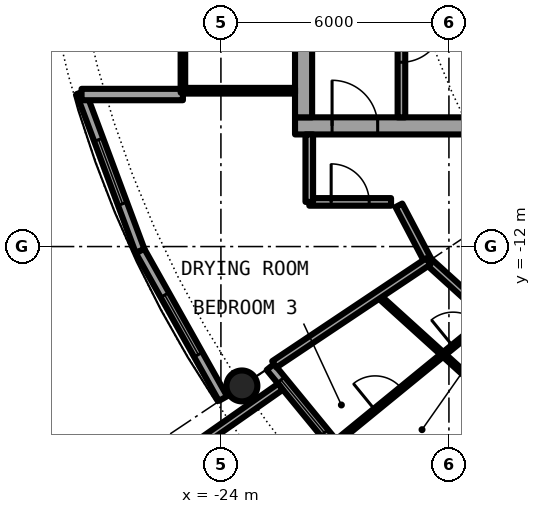
"""IFC4 building model, lengths in metres.
Left out: names, types, materials, properties, quantities, classifications, styles, units other than length and angle.
Written with IfcOpenShell. Run it as: python <this file> out.ifc"""

import sys

from ifc_helpers import new_model, si_unit, direction, frame, frame_2d, origin, origin_2d, place, context, subcontext, project, spatial, rectangle, hollow_circle, extrude, element, fill, save


model = new_model("IFC4")
c1 = context("Model", 3, precision=1e-05, world=origin(), true_north=direction((0.0, 1.0)))
c2 = subcontext(c1, "Body", "Model", "MODEL_VIEW")
j1 = project(units=[si_unit("LENGTHUNIT", "METRE"), si_unit("PLANEANGLEUNIT", "RADIAN")], contexts=[c1])
p1 = place(None, origin())
s1 = spatial("IfcSite", under=j1, at=p1, CompositionType="ELEMENT")
p2 = place(p1, origin())
s2 = spatial("IfcBuilding", under=s1, at=p2, CompositionType="ELEMENT")
p3 = place(p2, frame((0.0, 0.0, 202.4)))
s3 = spatial("IfcBuildingStorey", under=s2, at=p3, CompositionType="ELEMENT", Elevation=202.4)
p4 = place(p3, frame((-23.448, -15.667, 0.0), z_axis=(0.0, 0.0, 1.0), x_axis=(1.0, 0.0, 0.0)))
e1 = element("IfcColumn", 1, at=p4, inside=s3, PredefinedType="COLUMN", context=c2, shape_type="SweptSolid", body=[
    extrude(hollow_circle(Radius=0.406, WallThickness=0.03, at=origin_2d()), origin(), (0.0, 0.0, 1.0), 3.05),
])
p5 = place(p3, frame((-22.699, -15.167, 0.0), z_axis=(0.0, 0.0, 1.0), x_axis=(0.634382322723, -0.773019449054, 0.0)))
e2 = element("IfcWall", 2, at=p5, inside=s3, PredefinedType="SOLIDWALL", context=c2, shape_type="SweptSolid", body=[
    extrude(rectangle(XDim=5.352, YDim=0.25, at=frame_2d((2.676, 0.0))), origin(), (0.0, 0.0, 1.0), 2.7),
])
p6 = place(p5, frame((0.441, 0.0, 0.3)))
e3 = element("IfcOpeningElement", 3, at=p6, cuts=e2, PredefinedType="OPENING", context=c2, shape_type="SweptSolid", body=[
    extrude(rectangle(XDim=1.8, YDim=2.1, at=frame_2d((0.9, 1.05))), frame((0.0, 0.135, 0.0), z_axis=(0.0, -1.0, 0.0), x_axis=(1.0, 0.0, 0.0)), (0.0, 0.0, 1.0), 0.27),
])
p7 = place(p5, frame((3.51, 0.0, 0.0)))
e4 = element("IfcOpeningElement", 4, at=p7, cuts=e2, PredefinedType="OPENING", context=c2, shape_type="SweptSolid", body=[
    extrude(rectangle(XDim=1.0, YDim=2.2, at=frame_2d((0.5, 1.1))), frame((0.0, 0.135, 0.0), z_axis=(0.0, -1.0, 0.0), x_axis=(1.0, 0.0, 0.0)), (0.0, 0.0, 1.0), 0.27),
])
p8 = place(p3, frame((-22.433, -15.688, -0.03), z_axis=(0.0, 0.0, 1.0), x_axis=(-0.819373043115, -0.573260687834, 0.0)))
e5 = element("IfcWall", 5, at=p8, inside=s3, PredefinedType="SOLIDWALL", context=c2, shape_type="SweptSolid", body=[
    extrude(rectangle(XDim=2.925, YDim=0.2, at=frame_2d((1.463, 0.0))), origin(), (0.0, 0.0, 1.0), 2.73),
])
p9 = place(p3, frame((-27.682, -7.945, 0.0), z_axis=(0.0, 0.0, 1.0), x_axis=(0.349247811493, -0.937030397675, 0.0)))
e6 = element("IfcWall", 6, at=p9, inside=s3, PredefinedType="SOLIDWALL", context=c2, shape_type="SweptSolid", body=[
    extrude(rectangle(XDim=4.452, YDim=0.25, at=frame_2d((2.226, 0.0))), origin(), (0.0, 0.0, 1.0), 2.7),
])
p10 = place(p9, frame((1.327, 0.0, 0.3)))
e7 = element("IfcOpeningElement", 7, at=p10, cuts=e6, PredefinedType="OPENING", context=c2, shape_type="SweptSolid", body=[
    extrude(rectangle(XDim=1.8, YDim=2.1, at=frame_2d((0.9, 1.05))), frame((0.0, 0.135, 0.0), z_axis=(0.0, -1.0, 0.0), x_axis=(1.0, 0.0, 0.0)), (0.0, 0.0, 1.0), 0.27),
])
p11 = place(p3, frame((-26.127, -12.117, 0.0), z_axis=(0.0, 0.0, 1.0), x_axis=(0.489696356642, -0.871893042919, 0.0)))
e8 = element("IfcWall", 8, at=p11, inside=s3, PredefinedType="SOLIDWALL", context=c2, shape_type="SweptSolid", body=[
    extrude(rectangle(XDim=4.454, YDim=0.25, at=frame_2d((2.227, 0.0))), origin(), (0.0, 0.0, 1.0), 2.7),
])
p12 = place(p11, frame((1.327, 0.0, 0.3)))
e9 = element("IfcOpeningElement", 9, at=p12, cuts=e8, PredefinedType="OPENING", context=c2, shape_type="SweptSolid", body=[
    extrude(rectangle(XDim=1.8, YDim=2.1, at=frame_2d((0.9, 1.05))), frame((0.0, 0.135, 0.0), z_axis=(0.0, -1.0, 0.0), x_axis=(1.0, 0.0, 0.0)), (0.0, 0.0, 1.0), 0.27),
])
p13 = place(p3, frame((-25.0, -8.0, 0.0), z_axis=(0.0, 0.0, 1.0), x_axis=(-1.0, 0.0, 0.0)))
e10 = element("IfcWall", 10, at=p13, inside=s3, PredefinedType="SOLIDWALL", context=c2, shape_type="SweptSolid", body=[
    extrude(rectangle(XDim=2.667, YDim=0.3, at=frame_2d((1.333, 0.0))), origin(), (0.0, 0.0, 1.0), 2.7),
])
p14 = place(p3, frame((-22.05, -8.825, 0.0), z_axis=(0.0, 0.0, 1.0), x_axis=(1.0, 0.0, 0.0)))
e11 = element("IfcWall", 11, at=p14, inside=s3, PredefinedType="SHEAR", context=c2, shape_type="SweptSolid", body=[
    extrude(rectangle(XDim=13.5, YDim=0.45, at=frame_2d((6.75, 0.0))), origin(), (0.0, 0.0, 1.0), 3.05),
])
p15 = place(p14, frame((0.975, 0.0, 0.0)))
e12 = element("IfcOpeningElement", 12, at=p15, cuts=e11, PredefinedType="OPENING", context=c2, shape_type="SweptSolid", body=[
    extrude(rectangle(XDim=1.2, YDim=2.3, at=frame_2d((0.6, 1.15))), frame((0.0, 0.235, 0.0), z_axis=(0.0, -1.0, 0.0), x_axis=(1.0, 0.0, 0.0)), (0.0, 0.0, 1.0), 0.47),
])
p16 = place(p3, frame((-21.825, -8.6, 0.0), z_axis=(0.0, 0.0, 1.0), x_axis=(0.0, 1.0, 0.0)))
e13 = element("IfcWall", 13, at=p16, inside=s3, PredefinedType="SHEAR", context=c2, shape_type="SweptSolid", body=[
    extrude(rectangle(XDim=17.2, YDim=0.45, at=frame_2d((8.6, 0.0))), origin(), (0.0, 0.0, 1.0), 3.05),
])
p17 = place(p16, frame((7.7, 0.0, 0.0)))
e14 = element("IfcOpeningElement", 14, at=p17, cuts=e13, PredefinedType="OPENING", context=c2, shape_type="SweptSolid", body=[
    extrude(rectangle(XDim=1.8, YDim=2.3, at=frame_2d((0.9, 1.15))), frame((0.0, 0.235, 0.0), z_axis=(0.0, -1.0, 0.0), x_axis=(1.0, 0.0, 0.0)), (0.0, 0.0, 1.0), 0.47),
])
p18 = place(p3, frame((-19.25, -1.575, 0.0), z_axis=(0.0, 0.0, 1.0), x_axis=(0.0, -1.0, 0.0)))
e15 = element("IfcWall", 15, at=p18, inside=s3, PredefinedType="SOLIDWALL", context=c2, shape_type="SweptSolid", body=[
    extrude(rectangle(XDim=7.025, YDim=0.2, at=frame_2d((3.513, 0.0))), origin(), (0.0, 0.0, 1.0), 2.7),
])
p19 = place(p18, frame((4.475, 0.0, 0.0)))
e16 = element("IfcOpeningElement", 16, at=p19, cuts=e15, PredefinedType="OPENING", context=c2, shape_type="SweptSolid", body=[
    extrude(rectangle(XDim=1.1, YDim=2.3, at=frame_2d((0.55, 1.15))), frame((0.0, 0.11, 0.0), z_axis=(0.0, -1.0, 0.0), x_axis=(1.0, 0.0, 0.0)), (0.0, 0.0, 1.0), 0.22),
])
p20 = place(p3, frame((-22.05, -7.9, 0.0), z_axis=(0.0, 0.0, 1.0), x_axis=(-1.0, 0.0, 0.0)))
e17 = element("IfcWall", 17, at=p20, inside=s3, PredefinedType="PARTITIONING", context=c2, shape_type="SweptSolid", body=[
    extrude(rectangle(XDim=2.89, YDim=0.15, at=frame_2d((1.445, 0.0))), origin(), (0.0, 0.0, 1.0), 2.7),
])
p21 = place(p3, frame((-25.0, 7.95, 0.0), z_axis=(0.0, 0.0, 1.0), x_axis=(0.0, -1.0, 0.0)))
e18 = element("IfcWall", 18, at=p21, inside=s3, PredefinedType="PARTITIONING", context=c2, shape_type="SweptSolid", body=[
    extrude(rectangle(XDim=15.9, YDim=0.12, at=frame_2d((7.95, 0.0))), origin(), (0.0, 0.0, 1.0), 2.7),
])
p22 = place(p21, frame((0.95, 0.0, 0.1)))
e19 = element("IfcOpeningElement", 19, at=p22, cuts=e18, PredefinedType="OPENING", context=c2, shape_type="SweptSolid", body=[
    extrude(rectangle(XDim=14.0, YDim=2.35, at=frame_2d((7.0, 1.175))), frame((0.0, 0.07, 0.0), z_axis=(0.0, -1.0, 0.0), x_axis=(1.0, 0.0, 0.0)), (0.0, 0.0, 1.0), 0.14),
])
p23 = place(p3, frame((-19.869, -13.284, 0.0), z_axis=(0.0, 0.0, 1.0), x_axis=(0.741104058203, -0.67139018083, 0.0)))
e20 = element("IfcWall", 20, at=p23, inside=s3, PredefinedType="PARTITIONING", context=c2, shape_type="SweptSolid", body=[
    extrude(rectangle(XDim=6.969, YDim=0.1, at=frame_2d((3.484, 0.0))), origin(), (0.0, 0.0, 1.0), 2.7),
])
p24 = place(p23, frame((3.028, 0.0, 0.0)))
e21 = element("IfcOpeningElement", 21, at=p24, cuts=e20, PredefinedType="OPENING", context=c2, shape_type="SweptSolid", body=[
    extrude(rectangle(XDim=0.9, YDim=2.3, at=frame_2d((0.45, 1.15))), frame((0.0, 0.06, 0.0), z_axis=(0.0, -1.0, 0.0), x_axis=(1.0, 0.0, 0.0)), (0.0, 0.0, 1.0), 0.12),
])
p25 = place(p3, frame((-19.317, -10.915, 0.0), z_axis=(0.0, 0.0, 1.0), x_axis=(0.465359652486, -0.885121683068, 0.0)))
e22 = element("IfcWall", 22, at=p25, inside=s3, PredefinedType="PARTITIONING", context=c2, shape_type="SweptSolid", body=[
    extrude(rectangle(XDim=1.665, YDim=0.2, at=frame_2d((0.833, 0.0))), origin(), (0.0, 0.0, 1.0), 2.7),
])
p26 = place(p3, frame((-18.542, -12.389, 0.0), z_axis=(0.0, 0.0, 1.0), x_axis=(0.74093897184, -0.671572363941, 0.0)))
e23 = element("IfcWall", 23, at=p26, inside=s3, PredefinedType="PARTITIONING", context=c2, shape_type="SweptSolid", body=[
    extrude(rectangle(XDim=10.84, YDim=0.2, at=frame_2d((5.42, 0.0))), origin(), (0.0, 0.0, 1.0), 2.7),
])
p27 = place(p26, frame((6.544, 0.0, 0.0)))
e24 = element("IfcOpeningElement", 24, at=p27, cuts=e23, PredefinedType="OPENING", context=c2, shape_type="SweptSolid", body=[
    extrude(rectangle(XDim=1.0, YDim=2.3, at=frame_2d((0.5, 1.15))), frame((0.0, 0.11, 0.0), z_axis=(0.0, -1.0, 0.0), x_axis=(1.0, 0.0, 0.0)), (0.0, 0.0, 1.0), 0.22),
])
p28 = place(p3, frame((-21.675, -10.825, 0.0), z_axis=(0.0, 0.0, 1.0), x_axis=(1.0, 0.0, 0.0)))
e25 = element("IfcWall", 25, at=p28, inside=s3, PredefinedType="PARTITIONING", context=c2, shape_type="SweptSolid", body=[
    extrude(rectangle(XDim=2.152, YDim=0.2, at=frame_2d((1.076, 0.0))), origin(), (0.0, 0.0, 1.0), 2.7),
])
p29 = place(p28, frame((0.576, 0.0, 0.0)))
e26 = element("IfcOpeningElement", 26, at=p29, cuts=e25, PredefinedType="OPENING", context=c2, shape_type="SweptSolid", body=[
    extrude(rectangle(XDim=1.0, YDim=2.3, at=frame_2d((0.5, 1.15))), frame((0.0, 0.11, 0.0), z_axis=(0.0, -1.0, 0.0), x_axis=(1.0, 0.0, 0.0)), (0.0, 0.0, 1.0), 0.22),
])
p30 = place(p3, frame((-22.595, -15.098, 0.0), z_axis=(0.0, 0.0, 1.0), x_axis=(0.831387096605, 0.55569370664, 0.0)))
e27 = element("IfcWall", 27, at=p30, inside=s3, PredefinedType="PARTITIONING", context=c2, shape_type="SweptSolid", body=[
    extrude(rectangle(XDim=4.875, YDim=0.2, at=frame_2d((2.438, 0.0))), origin(), (0.0, 0.0, 1.0), 2.7),
])
p31 = place(p3, frame((-21.04, -17.199, 0.0), z_axis=(0.0, 0.0, 1.0), x_axis=(0.774310172558, 0.632806255241, 0.0)))
e28 = element("IfcWall", 28, at=p31, inside=s3, PredefinedType="PARTITIONING", context=c2, shape_type="SweptSolid", body=[
    extrude(rectangle(XDim=5.3, YDim=0.1, at=frame_2d((2.65, 0.0))), origin(), (0.0, 0.0, 1.0), 2.7),
])
p32 = place(p31, frame((4.066, 0.0, 0.0)))
e29 = element("IfcOpeningElement", 29, at=p32, cuts=e28, PredefinedType="OPENING", context=c2, shape_type="SweptSolid", body=[
    extrude(rectangle(XDim=0.9, YDim=2.3, at=frame_2d((0.45, 1.15))), frame((0.0, 0.06, 0.0), z_axis=(0.0, -1.0, 0.0), x_axis=(1.0, 0.0, 0.0)), (0.0, 0.0, 1.0), 0.12),
])
p33 = place(p31, frame((1.416, 0.0, 0.0)))
e30 = element("IfcOpeningElement", 30, at=p33, cuts=e28, PredefinedType="OPENING", context=c2, shape_type="SweptSolid", body=[
    extrude(rectangle(XDim=0.9, YDim=2.3, at=frame_2d((0.45, 1.15))), frame((0.0, 0.06, 0.0), z_axis=(0.0, -1.0, 0.0), x_axis=(1.0, 0.0, 0.0)), (0.0, 0.0, 1.0), 0.12),
])
p34 = place(p3, frame((-19.234, -19.197, 0.0), z_axis=(0.0, 0.0, 1.0), x_axis=(0.707722727509, 0.706490297858, 0.0)))
e31 = element("IfcWall", 31, at=p34, inside=s3, PredefinedType="PARTITIONING", context=c2, shape_type="SweptSolid", body=[
    extrude(rectangle(XDim=3.962, YDim=0.1, at=frame_2d((1.981, 0.0))), origin(), (0.0, 0.0, 1.0), 2.7),
])
p35 = place(p3, frame((-21.675, -10.825, 0.0), z_axis=(0.0, 0.0, 1.0), x_axis=(0.0, 1.0, 0.0)))
e32 = element("IfcWall", 32, at=p35, inside=s3, PredefinedType="PARTITIONING", context=c2, shape_type="SweptSolid", body=[
    extrude(rectangle(XDim=1.775, YDim=0.2, at=frame_2d((0.887, 0.0))), origin(), (0.0, 0.0, 1.0), 2.7),
])
p36 = place(p6, origin())
e33 = element("IfcWindow", 33, at=p36, inside=s3, PartitioningType="SINGLE_PANEL", PredefinedType="WINDOW", context=c2, shape_type="SweptSolid", body=[
    extrude(rectangle(XDim=1.8, YDim=2.1, at=frame_2d((0.9, 1.05))), frame((0.0, 0.03, 0.0), z_axis=(0.0, -1.0, 0.0), x_axis=(1.0, 0.0, 0.0)), (0.0, 0.0, 1.0), 0.06),
])
fill(e3, e33)
p37 = place(p10, origin())
e34 = element("IfcWindow", 34, at=p37, inside=s3, PartitioningType="SINGLE_PANEL", PredefinedType="WINDOW", context=c2, shape_type="SweptSolid", body=[
    extrude(rectangle(XDim=1.8, YDim=2.1, at=frame_2d((0.9, 1.05))), frame((0.0, 0.03, 0.0), z_axis=(0.0, -1.0, 0.0), x_axis=(1.0, 0.0, 0.0)), (0.0, 0.0, 1.0), 0.06),
])
fill(e7, e34)
p38 = place(p12, origin())
e35 = element("IfcWindow", 35, at=p38, inside=s3, PartitioningType="SINGLE_PANEL", PredefinedType="WINDOW", context=c2, shape_type="SweptSolid", body=[
    extrude(rectangle(XDim=1.8, YDim=2.1, at=frame_2d((0.9, 1.05))), frame((0.0, 0.03, 0.0), z_axis=(0.0, -1.0, 0.0), x_axis=(1.0, 0.0, 0.0)), (0.0, 0.0, 1.0), 0.06),
])
fill(e9, e35)
p39 = place(p19, origin())
e36 = element("IfcDoor", 36, at=p39, inside=s3, OperationType="SINGLE_SWING_LEFT", PredefinedType="DOOR", context=c2, shape_type="SweptSolid", body=[
    extrude(rectangle(XDim=1.1, YDim=2.3, at=frame_2d((0.55, 1.15))), frame((0.0, 0.025, 0.0), z_axis=(0.0, -1.0, 0.0), x_axis=(1.0, 0.0, 0.0)), (0.0, 0.0, 1.0), 0.05),
])
fill(e16, e36)
p40 = place(p15, origin())
e37 = element("IfcDoor", 37, at=p40, inside=s3, OperationType="SINGLE_SWING_RIGHT", PredefinedType="DOOR", context=c2, shape_type="SweptSolid", body=[
    extrude(rectangle(XDim=1.2, YDim=2.3, at=frame_2d((0.6, 1.15))), frame((0.0, 0.025, 0.0), z_axis=(0.0, -1.0, 0.0), x_axis=(1.0, 0.0, 0.0)), (0.0, 0.0, 1.0), 0.05),
])
fill(e12, e37)
p41 = place(p22, origin())
e38 = element("IfcWindow", 38, at=p41, inside=s3, PartitioningType="SINGLE_PANEL", PredefinedType="WINDOW", context=c2, shape_type="SweptSolid", body=[
    extrude(rectangle(XDim=14.0, YDim=2.35, at=frame_2d((7.0, 1.175))), frame((0.0, 0.03, 0.0), z_axis=(0.0, -1.0, 0.0), x_axis=(1.0, 0.0, 0.0)), (0.0, 0.0, 1.0), 0.06),
])
fill(e19, e38)
p42 = place(p32, origin())
e39 = element("IfcDoor", 39, at=p42, inside=s3, OperationType="SINGLE_SWING_RIGHT", PredefinedType="DOOR", context=c2, shape_type="SweptSolid", body=[
    extrude(rectangle(XDim=0.9, YDim=2.3, at=frame_2d((0.45, 1.15))), frame((0.0, 0.025, 0.0), z_axis=(0.0, -1.0, 0.0), x_axis=(1.0, 0.0, 0.0)), (0.0, 0.0, 1.0), 0.05),
])
fill(e29, e39)
p43 = place(p33, origin())
e40 = element("IfcDoor", 40, at=p43, inside=s3, OperationType="SINGLE_SWING_LEFT", PredefinedType="DOOR", context=c2, shape_type="SweptSolid", body=[
    extrude(rectangle(XDim=0.9, YDim=2.3, at=frame_2d((0.45, 1.15))), frame((0.0, 0.025, 0.0), z_axis=(0.0, -1.0, 0.0), x_axis=(1.0, 0.0, 0.0)), (0.0, 0.0, 1.0), 0.05),
])
fill(e30, e40)
p44 = place(p29, origin())
e41 = element("IfcDoor", 41, at=p44, inside=s3, OperationType="SINGLE_SWING_LEFT", PredefinedType="DOOR", context=c2, shape_type="SweptSolid", body=[
    extrude(rectangle(XDim=1.0, YDim=2.3, at=frame_2d((0.5, 1.15))), frame((0.0, 0.025, 0.0), z_axis=(0.0, -1.0, 0.0), x_axis=(1.0, 0.0, 0.0)), (0.0, 0.0, 1.0), 0.05),
])
fill(e26, e41)
save(model, sys.argv[1])
